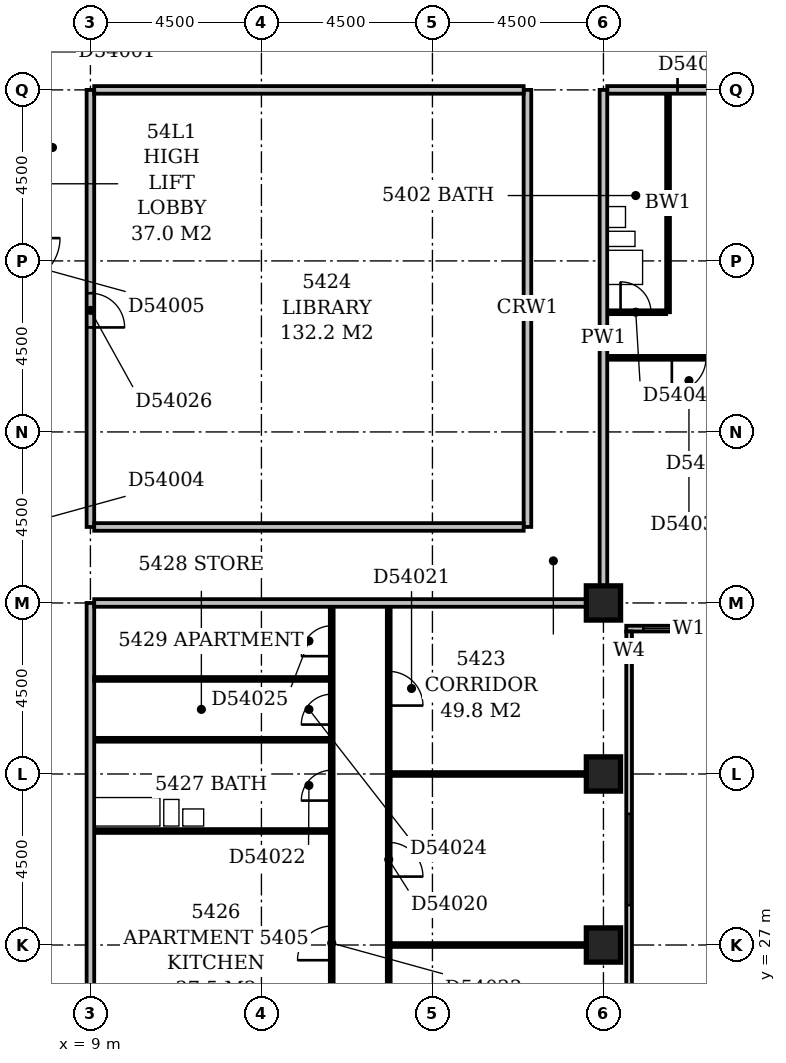
"""IFC4 building model, lengths in metres.
Left out: names, types, materials, properties, quantities, classifications, styles, units other than length and angle.
Written with IfcOpenShell. Run it as: python <this file> out.ifc"""

import sys

from ifc_helpers import new_model, si_unit, direction, frame, frame_2d, origin, origin_2d, place, context, subcontext, project, spatial, rectangle, extrude, element, fill, save


model = new_model("IFC4")
c1 = context("Model", 3, precision=1e-05, world=origin(), true_north=direction((0.0, 1.0)))
c2 = subcontext(c1, "Body", "Model", "MODEL_VIEW")
j1 = project(units=[si_unit("LENGTHUNIT", "METRE"), si_unit("PLANEANGLEUNIT", "RADIAN")], contexts=[c1])
p1 = place(None, origin())
s1 = spatial("IfcSite", under=j1, at=p1, CompositionType="ELEMENT")
p2 = place(p1, origin())
s2 = spatial("IfcBuilding", under=s1, at=p2, CompositionType="ELEMENT")
p3 = place(p2, frame((0.0, 0.0, 211.4)))
s3 = spatial("IfcBuildingStorey", under=s2, at=p3, CompositionType="ELEMENT", Elevation=211.4)
for number, where, z_axis, x_axis in (
    (1, (22.5, 27.0, -0.35), (0.0, 0.0, 1.0), (1.0, 0.0, 0.0)),
    (2, (22.5, 31.5, -0.35), (0.0, 0.0, 1.0), (1.0, 0.0, 0.0)),
    (3, (22.5, 36.0, -0.35), (0.0, 0.0, 1.0), (1.0, 0.0, 0.0)),
):
    element("IfcColumn", number, at=place(p3, frame(where, z_axis=z_axis, x_axis=x_axis)), inside=s3, PredefinedType="COLUMN", context=c2, shape_type="SweptSolid", body=[
        extrude(rectangle(XDim=0.9, YDim=0.9, at=origin_2d()), origin(), (0.0, 0.0, 1.0), 3.65),
    ])
p4 = place(p3, frame((23.175, 17.4, 0.0), z_axis=(0.0, 0.0, 1.0), x_axis=(0.0, 1.0, 0.0)))
e4 = element("IfcWall", 4, at=p4, inside=s3, PredefinedType="STANDARD", context=c2, shape_type="SweptSolid", body=[
    extrude(rectangle(XDim=17.85, YDim=0.15, at=frame_2d((8.925, 0.0))), origin(), (0.0, 0.0, 1.0), 2.7),
])
p5 = place(p4, frame((1.65, 0.0, 0.6)))
e5 = element("IfcOpeningElement", 5, at=p5, cuts=e4, PredefinedType="OPENING", context=c2, shape_type="SweptSolid", body=[
    extrude(rectangle(XDim=2.4, YDim=1.8, at=frame_2d((1.2, 0.9))), frame((0.0, 0.087, 0.0), z_axis=(0.0, -1.0, 0.0), x_axis=(1.0, 0.0, 0.0)), (0.0, 0.0, 1.0), 0.174),
])
p6 = place(p4, frame((6.15, 0.0, 0.6)))
e6 = element("IfcOpeningElement", 6, at=p6, cuts=e4, PredefinedType="OPENING", context=c2, shape_type="SweptSolid", body=[
    extrude(rectangle(XDim=2.4, YDim=1.8, at=frame_2d((1.2, 0.9))), frame((0.0, 0.087, 0.0), z_axis=(0.0, -1.0, 0.0), x_axis=(1.0, 0.0, 0.0)), (0.0, 0.0, 1.0), 0.174),
])
p7 = place(p4, frame((10.65, 0.0, 0.6)))
e7 = element("IfcOpeningElement", 7, at=p7, cuts=e4, PredefinedType="OPENING", context=c2, shape_type="SweptSolid", body=[
    extrude(rectangle(XDim=2.4, YDim=1.8, at=frame_2d((1.2, 0.9))), frame((0.0, 0.087, 0.0), z_axis=(0.0, -1.0, 0.0), x_axis=(1.0, 0.0, 0.0)), (0.0, 0.0, 1.0), 0.174),
])
p8 = place(p4, frame((17.027, 0.0, 0.6)))
e8 = element("IfcOpeningElement", 8, at=p8, cuts=e4, PredefinedType="OPENING", context=c2, shape_type="SweptSolid", body=[
    extrude(rectangle(XDim=0.6, YDim=1.8, at=frame_2d((0.3, 0.9))), frame((0.0, 0.087, 0.0), z_axis=(0.0, -1.0, 0.0), x_axis=(1.0, 0.0, 0.0)), (0.0, 0.0, 1.0), 0.174),
])
p9 = place(p3, frame((23.1, 35.325, 0.0), z_axis=(0.0, 0.0, 1.0), x_axis=(1.0, 0.0, 0.0)))
e9 = element("IfcWall", 9, at=p9, inside=s3, PredefinedType="STANDARD", context=c2, shape_type="SweptSolid", body=[
    extrude(rectangle(XDim=27.15, YDim=0.15, at=frame_2d((13.575, 0.0))), origin(), (0.0, 0.0, 1.0), 2.7),
])
p10 = place(p9, frame((0.45, 0.0, 0.6)))
e10 = element("IfcOpeningElement", 10, at=p10, cuts=e9, PredefinedType="OPENING", context=c2, shape_type="SweptSolid", body=[
    extrude(rectangle(XDim=2.4, YDim=1.8, at=frame_2d((1.2, 0.9))), frame((0.0, 0.087, 0.0), z_axis=(0.0, -1.0, 0.0), x_axis=(1.0, 0.0, 0.0)), (0.0, 0.0, 1.0), 0.174),
])
p11 = place(p9, frame((4.95, 0.0, 0.6)))
e11 = element("IfcOpeningElement", 11, at=p11, cuts=e9, PredefinedType="OPENING", context=c2, shape_type="SweptSolid", body=[
    extrude(rectangle(XDim=2.4, YDim=1.8, at=frame_2d((1.2, 0.9))), frame((0.0, 0.087, 0.0), z_axis=(0.0, -1.0, 0.0), x_axis=(1.0, 0.0, 0.0)), (0.0, 0.0, 1.0), 0.174),
])
p12 = place(p9, frame((9.062, 0.0, 0.6)))
e12 = element("IfcOpeningElement", 12, at=p12, cuts=e9, PredefinedType="OPENING", context=c2, shape_type="SweptSolid", body=[
    extrude(rectangle(XDim=1.8, YDim=1.8, at=frame_2d((0.9, 0.9))), frame((0.0, 0.087, 0.0), z_axis=(0.0, -1.0, 0.0), x_axis=(1.0, 0.0, 0.0)), (0.0, 0.0, 1.0), 0.174),
])
p13 = place(p9, frame((15.157, 0.0, 0.6)))
e13 = element("IfcOpeningElement", 13, at=p13, cuts=e9, PredefinedType="OPENING", context=c2, shape_type="SweptSolid", body=[
    extrude(rectangle(XDim=1.5, YDim=1.8, at=frame_2d((0.75, 0.9))), frame((0.0, 0.087, 0.0), z_axis=(0.0, -1.0, 0.0), x_axis=(1.0, 0.0, 0.0)), (0.0, 0.0, 1.0), 0.174),
])
p14 = place(p9, frame((18.45, 0.0, 0.6)))
e14 = element("IfcOpeningElement", 14, at=p14, cuts=e9, PredefinedType="OPENING", context=c2, shape_type="SweptSolid", body=[
    extrude(rectangle(XDim=2.4, YDim=1.8, at=frame_2d((1.2, 0.9))), frame((0.0, 0.087, 0.0), z_axis=(0.0, -1.0, 0.0), x_axis=(1.0, 0.0, 0.0)), (0.0, 0.0, 1.0), 0.174),
])
p15 = place(p9, frame((22.95, 0.0, 0.6)))
e15 = element("IfcOpeningElement", 15, at=p15, cuts=e9, PredefinedType="OPENING", context=c2, shape_type="SweptSolid", body=[
    extrude(rectangle(XDim=2.4, YDim=1.8, at=frame_2d((1.2, 0.9))), frame((0.0, 0.087, 0.0), z_axis=(0.0, -1.0, 0.0), x_axis=(1.0, 0.0, 0.0)), (0.0, 0.0, 1.0), 0.174),
])
p16 = place(p3, frame((9.0, 18.45, 0.0), z_axis=(0.0, 0.0, 1.0), x_axis=(0.0, 1.0, 0.0)))
e16 = element("IfcWall", 16, at=p16, inside=s3, PredefinedType="PARTITIONING", context=c2, shape_type="SweptSolid", body=[
    extrude(rectangle(XDim=17.55, YDim=0.2, at=frame_2d((8.775, 0.0))), origin(), (0.0, 0.0, 1.0), 3.3),
])
p17 = place(p16, frame((4.35, 0.0, 0.0)))
e17 = element("IfcOpeningElement", 17, at=p17, cuts=e16, PredefinedType="OPENING", context=c2, shape_type="SweptSolid", body=[
    extrude(rectangle(XDim=1.0, YDim=2.1, at=frame_2d((0.5, 1.05))), frame((0.0, 0.112, 0.0), z_axis=(0.0, -1.0, 0.0), x_axis=(1.0, 0.0, 0.0)), (0.0, 0.0, 1.0), 0.224),
])
p18 = place(p16, frame((2.8, 0.0, 0.0)))
e18 = element("IfcOpeningElement", 18, at=p18, cuts=e16, PredefinedType="OPENING", context=c2, shape_type="SweptSolid", body=[
    extrude(rectangle(XDim=1.0, YDim=2.1, at=frame_2d((0.5, 1.05))), frame((0.0, 0.112, 0.0), z_axis=(0.0, -1.0, 0.0), x_axis=(1.0, 0.0, 0.0)), (0.0, 0.0, 1.0), 0.224),
])
p19 = place(p3, frame((16.85, 22.6, 0.0), z_axis=(0.0, 0.0, 1.0), x_axis=(0.0, 1.0, 0.0)))
e19 = element("IfcWall", 19, at=p19, inside=s3, PredefinedType="PARTITIONING", context=c2, shape_type="SweptSolid", body=[
    extrude(rectangle(XDim=13.3, YDim=0.1, at=frame_2d((6.65, 0.0))), origin(), (0.0, 0.0, 1.0), 3.3),
])
p20 = place(p19, frame((1.7, 0.0, 0.0)))
e20 = element("IfcOpeningElement", 20, at=p20, cuts=e19, PredefinedType="OPENING", context=c2, shape_type="SweptSolid", body=[
    extrude(rectangle(XDim=0.9, YDim=2.1, at=frame_2d((0.45, 1.05))), frame((0.0, 0.062, 0.0), z_axis=(0.0, -1.0, 0.0), x_axis=(1.0, 0.0, 0.0)), (0.0, 0.0, 1.0), 0.124),
])
p21 = place(p19, frame((6.2, 0.0, 0.0)))
e21 = element("IfcOpeningElement", 21, at=p21, cuts=e19, PredefinedType="OPENING", context=c2, shape_type="SweptSolid", body=[
    extrude(rectangle(XDim=0.9, YDim=2.1, at=frame_2d((0.45, 1.05))), frame((0.0, 0.062, 0.0), z_axis=(0.0, -1.0, 0.0), x_axis=(1.0, 0.0, 0.0)), (0.0, 0.0, 1.0), 0.124),
])
p22 = place(p19, frame((10.7, 0.0, 0.0)))
e22 = element("IfcOpeningElement", 22, at=p22, cuts=e19, PredefinedType="OPENING", context=c2, shape_type="SweptSolid", body=[
    extrude(rectangle(XDim=0.9, YDim=2.1, at=frame_2d((0.45, 1.05))), frame((0.0, 0.062, 0.0), z_axis=(0.0, -1.0, 0.0), x_axis=(1.0, 0.0, 0.0)), (0.0, 0.0, 1.0), 0.124),
])
p23 = place(p3, frame((15.35, 24.1, 0.0), z_axis=(0.0, 0.0, 1.0), x_axis=(0.0, 1.0, 0.0)))
e23 = element("IfcWall", 23, at=p23, inside=s3, PredefinedType="PARTITIONING", context=c2, shape_type="SweptSolid", body=[
    extrude(rectangle(XDim=11.8, YDim=0.1, at=frame_2d((5.9, 0.0))), origin(), (0.0, 0.0, 1.0), 3.3),
])
p24 = place(p23, frame((6.7, 0.0, 0.0)))
e24 = element("IfcOpeningElement", 24, at=p24, cuts=e23, PredefinedType="OPENING", context=c2, shape_type="SweptSolid", body=[
    extrude(rectangle(XDim=0.8, YDim=2.1, at=frame_2d((0.4, 1.05))), frame((0.0, 0.062, 0.0), z_axis=(0.0, -1.0, 0.0), x_axis=(1.0, 0.0, 0.0)), (0.0, 0.0, 1.0), 0.124),
])
p25 = place(p23, frame((2.5, 0.0, 0.0)))
e25 = element("IfcOpeningElement", 25, at=p25, cuts=e23, PredefinedType="OPENING", context=c2, shape_type="SweptSolid", body=[
    extrude(rectangle(XDim=0.9, YDim=2.1, at=frame_2d((0.45, 1.05))), frame((0.0, 0.062, 0.0), z_axis=(0.0, -1.0, 0.0), x_axis=(1.0, 0.0, 0.0)), (0.0, 0.0, 1.0), 0.124),
])
p26 = place(p23, frame((8.7, 0.0, 0.0)))
e26 = element("IfcOpeningElement", 26, at=p26, cuts=e23, PredefinedType="OPENING", context=c2, shape_type="SweptSolid", body=[
    extrude(rectangle(XDim=0.8, YDim=2.1, at=frame_2d((0.4, 1.05))), frame((0.0, 0.062, 0.0), z_axis=(0.0, -1.0, 0.0), x_axis=(1.0, 0.0, 0.0)), (0.0, 0.0, 1.0), 0.124),
])
p27 = place(p23, frame((10.5, 0.0, 0.0)))
e27 = element("IfcOpeningElement", 27, at=p27, cuts=e23, PredefinedType="OPENING", context=c2, shape_type="SweptSolid", body=[
    extrude(rectangle(XDim=0.8, YDim=2.1, at=frame_2d((0.4, 1.05))), frame((0.0, 0.062, 0.0), z_axis=(0.0, -1.0, 0.0), x_axis=(1.0, 0.0, 0.0)), (0.0, 0.0, 1.0), 0.124),
])
p28 = place(p3, frame((16.9, 27.0, 0.0), z_axis=(0.0, 0.0, 1.0), x_axis=(1.0, 0.0, 0.0)))
e28 = element("IfcWall", 28, at=p28, inside=s3, PredefinedType="PARTITIONING", context=c2, shape_type="SweptSolid", body=[
    extrude(rectangle(XDim=5.15, YDim=0.1, at=frame_2d((2.575, 0.0))), origin(), (0.0, 0.0, 1.0), 2.7),
])
p29 = place(p3, frame((9.1, 30.0, 0.0), z_axis=(0.0, 0.0, 1.0), x_axis=(1.0, 0.0, 0.0)))
e29 = element("IfcWall", 29, at=p29, inside=s3, PredefinedType="PLUMBINGWALL", context=c2, shape_type="SweptSolid", body=[
    extrude(rectangle(XDim=6.2, YDim=0.1, at=frame_2d((3.1, 0.0))), origin(), (0.0, 0.0, 1.0), 3.3),
])
p30 = place(p3, frame((16.9, 31.5, 0.0), z_axis=(0.0, 0.0, 1.0), x_axis=(1.0, 0.0, 0.0)))
e30 = element("IfcWall", 30, at=p30, inside=s3, PredefinedType="PARTITIONING", context=c2, shape_type="SweptSolid", body=[
    extrude(rectangle(XDim=5.15, YDim=0.1, at=frame_2d((2.575, 0.0))), origin(), (0.0, 0.0, 1.0), 3.3),
])
p31 = place(p3, frame((9.1, 32.4, 0.0), z_axis=(0.0, 0.0, 1.0), x_axis=(1.0, 0.0, 0.0)))
e31 = element("IfcWall", 31, at=p31, inside=s3, PredefinedType="PLUMBINGWALL", context=c2, shape_type="SweptSolid", body=[
    extrude(rectangle(XDim=6.2, YDim=0.1, at=frame_2d((3.1, 0.0))), origin(), (0.0, 0.0, 1.0), 3.3),
])
p32 = place(p3, frame((9.1, 34.0, 0.0), z_axis=(0.0, 0.0, 1.0), x_axis=(1.0, 0.0, 0.0)))
e32 = element("IfcWall", 32, at=p32, inside=s3, PredefinedType="PARTITIONING", context=c2, shape_type="SweptSolid", body=[
    extrude(rectangle(XDim=6.2, YDim=0.1, at=frame_2d((3.1, 0.0))), origin(), (0.0, 0.0, 1.0), 3.3),
])
p33 = place(p3, frame((9.1, 36.0, 0.0), z_axis=(0.0, 0.0, 1.0), x_axis=(1.0, 0.0, 0.0)))
e33 = element("IfcWall", 33, at=p33, inside=s3, PredefinedType="PARTITIONING", context=c2, shape_type="SweptSolid", body=[
    extrude(rectangle(XDim=12.95, YDim=0.2, at=frame_2d((6.475, 0.0))), origin(), (0.0, 0.0, 1.0), 3.3),
])
p34 = place(p3, frame((22.5, 36.45, 0.0), z_axis=(0.0, 0.0, 1.0), x_axis=(0.0, 1.0, 0.0)))
e34 = element("IfcWall", 34, at=p34, inside=s3, PredefinedType="PARTITIONING", context=c2, shape_type="SweptSolid", body=[
    extrude(rectangle(XDim=13.05, YDim=0.2, at=frame_2d((6.525, 0.0))), origin(), (0.0, 0.0, 1.0), 3.3),
])
p35 = place(p3, frame((9.0, 38.0, 0.0), z_axis=(0.0, 0.0, 1.0), x_axis=(0.0, 1.0, 0.0)))
e35 = element("IfcWall", 35, at=p35, inside=s3, PredefinedType="PARTITIONING", context=c2, shape_type="SweptSolid", body=[
    extrude(rectangle(XDim=11.5, YDim=0.2, at=frame_2d((5.75, 0.0))), origin(), (0.0, 0.0, 1.0), 3.3),
])
p36 = place(p35, frame((5.25, 0.0, 0.0)))
e36 = element("IfcOpeningElement", 36, at=p36, cuts=e35, PredefinedType="OPENING", context=c2, shape_type="SweptSolid", body=[
    extrude(rectangle(XDim=0.9, YDim=2.1, at=frame_2d((0.45, 1.05))), frame((0.0, 0.112, 0.0), z_axis=(0.0, -1.0, 0.0), x_axis=(1.0, 0.0, 0.0)), (0.0, 0.0, 1.0), 0.224),
])
p37 = place(p3, frame((9.1, 38.0, 0.0), z_axis=(0.0, 0.0, 1.0), x_axis=(1.0, 0.0, 0.0)))
e37 = element("IfcWall", 37, at=p37, inside=s3, PredefinedType="PARTITIONING", context=c2, shape_type="SweptSolid", body=[
    extrude(rectangle(XDim=11.3, YDim=0.2, at=frame_2d((5.65, 0.0))), origin(), (0.0, 0.0, 1.0), 3.3),
])
p38 = place(p3, frame((20.5, 38.0, 0.0), z_axis=(0.0, 0.0, 1.0), x_axis=(0.0, 1.0, 0.0)))
e38 = element("IfcWall", 38, at=p38, inside=s3, PredefinedType="PARTITIONING", context=c2, shape_type="SweptSolid", body=[
    extrude(rectangle(XDim=11.5, YDim=0.2, at=frame_2d((5.75, 0.0))), origin(), (0.0, 0.0, 1.0), 3.3),
])
p39 = place(p3, frame((22.6, 42.45, 0.0), z_axis=(0.0, 0.0, 1.0), x_axis=(1.0, 0.0, 0.0)))
e39 = element("IfcWall", 39, at=p39, inside=s3, PredefinedType="PARTITIONING", context=c2, shape_type="SweptSolid", body=[
    extrude(rectangle(XDim=4.3, YDim=0.1, at=frame_2d((2.15, 0.0))), origin(), (0.0, 0.0, 1.0), 3.3),
])
p40 = place(p39, frame((1.7, 0.0, 0.0)))
e40 = element("IfcOpeningElement", 40, at=p40, cuts=e39, PredefinedType="OPENING", context=c2, shape_type="SweptSolid", body=[
    extrude(rectangle(XDim=0.9, YDim=2.1, at=frame_2d((0.45, 1.05))), frame((0.0, 0.062, 0.0), z_axis=(0.0, -1.0, 0.0), x_axis=(1.0, 0.0, 0.0)), (0.0, 0.0, 1.0), 0.124),
])
p41 = place(p3, frame((22.6, 43.65, 0.0), z_axis=(0.0, 0.0, 1.0), x_axis=(1.0, 0.0, 0.0)))
e41 = element("IfcWall", 41, at=p41, inside=s3, PredefinedType="PARTITIONING", context=c2, shape_type="SweptSolid", body=[
    extrude(rectangle(XDim=1.55, YDim=0.1, at=frame_2d((0.775, 0.0))), origin(), (0.0, 0.0, 1.0), 3.3),
])
p42 = place(p41, frame((0.35, 0.0, 0.0)))
e42 = element("IfcOpeningElement", 42, at=p42, cuts=e41, PredefinedType="OPENING", context=c2, shape_type="SweptSolid", body=[
    extrude(rectangle(XDim=0.8, YDim=2.1, at=frame_2d((0.4, 1.05))), frame((0.0, 0.062, 0.0), z_axis=(0.0, -1.0, 0.0), x_axis=(1.0, 0.0, 0.0)), (0.0, 0.0, 1.0), 0.124),
])
p43 = place(p3, frame((24.2, 43.65, 0.0), z_axis=(0.0, 0.0, 1.0), x_axis=(0.0, 1.0, 0.0)))
e43 = element("IfcWall", 43, at=p43, inside=s3, PredefinedType="PLUMBINGWALL", context=c2, shape_type="SweptSolid", body=[
    extrude(rectangle(XDim=5.75, YDim=0.1, at=frame_2d((2.875, 0.0))), origin(), (0.0, 0.0, 1.0), 3.3),
])
p44 = place(p3, frame((9.1, 49.5, 0.0), z_axis=(0.0, 0.0, 1.0), x_axis=(1.0, 0.0, 0.0)))
e44 = element("IfcWall", 44, at=p44, inside=s3, PredefinedType="PARTITIONING", context=c2, shape_type="SweptSolid", body=[
    extrude(rectangle(XDim=11.3, YDim=0.2, at=frame_2d((5.65, 0.0))), origin(), (0.0, 0.0, 1.0), 3.3),
])
p45 = place(p3, frame((22.6, 49.5, 0.0), z_axis=(0.0, 0.0, 1.0), x_axis=(1.0, 0.0, 0.0)))
e45 = element("IfcWall", 45, at=p45, inside=s3, PredefinedType="PARTITIONING", context=c2, shape_type="SweptSolid", body=[
    extrude(rectangle(XDim=30.95, YDim=0.2, at=frame_2d((15.475, 0.0))), origin(), (0.0, 0.0, 1.0), 3.3),
])
p46 = place(p45, frame((1.85, 0.0, 0.0)))
e46 = element("IfcOpeningElement", 46, at=p46, cuts=e45, PredefinedType="OPENING", context=c2, shape_type="SweptSolid", body=[
    extrude(rectangle(XDim=1.0, YDim=2.1, at=frame_2d((0.5, 1.05))), frame((0.0, 0.112, 0.0), z_axis=(0.0, -1.0, 0.0), x_axis=(1.0, 0.0, 0.0)), (0.0, 0.0, 1.0), 0.224),
])
p47 = place(p45, frame((4.7, 0.0, 0.0)))
e47 = element("IfcOpeningElement", 47, at=p47, cuts=e45, PredefinedType="OPENING", context=c2, shape_type="SweptSolid", body=[
    extrude(rectangle(XDim=1.0, YDim=2.1, at=frame_2d((0.5, 1.05))), frame((0.0, 0.112, 0.0), z_axis=(0.0, -1.0, 0.0), x_axis=(1.0, 0.0, 0.0)), (0.0, 0.0, 1.0), 0.224),
])
p48 = place(p45, frame((18.2, 0.0, 0.0)))
e48 = element("IfcOpeningElement", 48, at=p48, cuts=e45, PredefinedType="OPENING", context=c2, shape_type="SweptSolid", body=[
    extrude(rectangle(XDim=1.0, YDim=2.1, at=frame_2d((0.5, 1.05))), frame((0.0, 0.112, 0.0), z_axis=(0.0, -1.0, 0.0), x_axis=(1.0, 0.0, 0.0)), (0.0, 0.0, 1.0), 0.224),
])
p49 = place(p45, frame((27.15, 0.0, 0.0)))
e49 = element("IfcOpeningElement", 49, at=p49, cuts=e45, PredefinedType="OPENING", context=c2, shape_type="SweptSolid", body=[
    extrude(rectangle(XDim=1.0, YDim=2.1, at=frame_2d((0.5, 1.05))), frame((0.0, 0.112, 0.0), z_axis=(0.0, -1.0, 0.0), x_axis=(1.0, 0.0, 0.0)), (0.0, 0.0, 1.0), 0.224),
])
p50 = place(p7, origin())
e50 = element("IfcWindow", 50, at=p50, inside=s3, PartitioningType="SINGLE_PANEL", PredefinedType="WINDOW", context=c2, shape_type="SweptSolid", body=[
    extrude(rectangle(XDim=2.4, YDim=1.8, at=frame_2d((1.2, 0.9))), frame((0.0, 0.03, 0.0), z_axis=(0.0, -1.0, 0.0), x_axis=(1.0, 0.0, 0.0)), (0.0, 0.0, 1.0), 0.06),
])
fill(e7, e50)
p51 = place(p8, origin())
e51 = element("IfcWindow", 51, at=p51, inside=s3, PartitioningType="SINGLE_PANEL", PredefinedType="WINDOW", context=c2, shape_type="SweptSolid", body=[
    extrude(rectangle(XDim=0.6, YDim=1.8, at=frame_2d((0.3, 0.9))), frame((0.0, 0.03, 0.0), z_axis=(0.0, -1.0, 0.0), x_axis=(1.0, 0.0, 0.0)), (0.0, 0.0, 1.0), 0.06),
])
fill(e8, e51)
p52 = place(p10, origin())
e52 = element("IfcWindow", 52, at=p52, inside=s3, PartitioningType="SINGLE_PANEL", PredefinedType="WINDOW", context=c2, shape_type="SweptSolid", body=[
    extrude(rectangle(XDim=2.4, YDim=1.8, at=frame_2d((1.2, 0.9))), frame((0.0, 0.03, 0.0), z_axis=(0.0, -1.0, 0.0), x_axis=(1.0, 0.0, 0.0)), (0.0, 0.0, 1.0), 0.06),
])
fill(e10, e52)
p53 = place(p21, frame((0.9, 0.0, 0.0), z_axis=(0.0, 0.0, 1.0), x_axis=(-1.0, 0.0, 0.0)))
e53 = element("IfcDoor", 53, at=p53, inside=s3, OperationType="SINGLE_SWING_RIGHT", PredefinedType="DOOR", context=c2, shape_type="SweptSolid", body=[
    extrude(rectangle(XDim=0.9, YDim=2.1, at=frame_2d((0.45, 1.05))), frame((0.0, 0.025, 0.0), z_axis=(0.0, -1.0, 0.0), x_axis=(1.0, 0.0, 0.0)), (0.0, 0.0, 1.0), 0.05),
])
fill(e21, e53)
p54 = place(p22, frame((0.9, 0.0, 0.0), z_axis=(0.0, 0.0, 1.0), x_axis=(-1.0, 0.0, 0.0)))
e54 = element("IfcDoor", 54, at=p54, inside=s3, OperationType="SINGLE_SWING_RIGHT", PredefinedType="DOOR", context=c2, shape_type="SweptSolid", body=[
    extrude(rectangle(XDim=0.9, YDim=2.1, at=frame_2d((0.45, 1.05))), frame((0.0, 0.025, 0.0), z_axis=(0.0, -1.0, 0.0), x_axis=(1.0, 0.0, 0.0)), (0.0, 0.0, 1.0), 0.05),
])
fill(e22, e54)
p55 = place(p24, origin())
e55 = element("IfcDoor", 55, at=p55, inside=s3, OperationType="SINGLE_SWING_LEFT", PredefinedType="DOOR", context=c2, shape_type="SweptSolid", body=[
    extrude(rectangle(XDim=0.8, YDim=2.1, at=frame_2d((0.4, 1.05))), frame((0.0, 0.025, 0.0), z_axis=(0.0, -1.0, 0.0), x_axis=(1.0, 0.0, 0.0)), (0.0, 0.0, 1.0), 0.05),
])
fill(e24, e55)
p56 = place(p25, origin())
e56 = element("IfcDoor", 56, at=p56, inside=s3, OperationType="SINGLE_SWING_LEFT", PredefinedType="DOOR", context=c2, shape_type="SweptSolid", body=[
    extrude(rectangle(XDim=0.9, YDim=2.1, at=frame_2d((0.45, 1.05))), frame((0.0, 0.025, 0.0), z_axis=(0.0, -1.0, 0.0), x_axis=(1.0, 0.0, 0.0)), (0.0, 0.0, 1.0), 0.05),
])
fill(e25, e56)
p57 = place(p26, origin())
e57 = element("IfcDoor", 57, at=p57, inside=s3, OperationType="SINGLE_SWING_LEFT", PredefinedType="DOOR", context=c2, shape_type="SweptSolid", body=[
    extrude(rectangle(XDim=0.8, YDim=2.1, at=frame_2d((0.4, 1.05))), frame((0.0, 0.025, 0.0), z_axis=(0.0, -1.0, 0.0), x_axis=(1.0, 0.0, 0.0)), (0.0, 0.0, 1.0), 0.05),
])
fill(e26, e57)
p58 = place(p27, origin())
e58 = element("IfcDoor", 58, at=p58, inside=s3, OperationType="SINGLE_SWING_LEFT", PredefinedType="DOOR", context=c2, shape_type="SweptSolid", body=[
    extrude(rectangle(XDim=0.8, YDim=2.1, at=frame_2d((0.4, 1.05))), frame((0.0, 0.025, 0.0), z_axis=(0.0, -1.0, 0.0), x_axis=(1.0, 0.0, 0.0)), (0.0, 0.0, 1.0), 0.05),
])
fill(e27, e58)
p59 = place(p36, frame((0.9, 0.0, 0.0), z_axis=(0.0, 0.0, 1.0), x_axis=(-1.0, 0.0, 0.0)))
e59 = element("IfcDoor", 59, at=p59, inside=s3, OperationType="SINGLE_SWING_RIGHT", PredefinedType="DOOR", context=c2, shape_type="SweptSolid", body=[
    extrude(rectangle(XDim=0.9, YDim=2.1, at=frame_2d((0.45, 1.05))), frame((0.0, 0.025, 0.0), z_axis=(0.0, -1.0, 0.0), x_axis=(1.0, 0.0, 0.0)), (0.0, 0.0, 1.0), 0.05),
])
fill(e36, e59)
p60 = place(p40, frame((0.9, 0.0, 0.0), z_axis=(0.0, 0.0, 1.0), x_axis=(-1.0, 0.0, 0.0)))
e60 = element("IfcDoor", 60, at=p60, inside=s3, OperationType="SINGLE_SWING_RIGHT", PredefinedType="DOOR", context=c2, shape_type="SweptSolid", body=[
    extrude(rectangle(XDim=0.9, YDim=2.1, at=frame_2d((0.45, 1.05))), frame((0.0, 0.025, 0.0), z_axis=(0.0, -1.0, 0.0), x_axis=(1.0, 0.0, 0.0)), (0.0, 0.0, 1.0), 0.05),
])
fill(e40, e60)
p61 = place(p42, origin())
e61 = element("IfcDoor", 61, at=p61, inside=s3, OperationType="SINGLE_SWING_LEFT", PredefinedType="DOOR", context=c2, shape_type="SweptSolid", body=[
    extrude(rectangle(XDim=0.8, YDim=2.1, at=frame_2d((0.4, 1.05))), frame((0.0, 0.025, 0.0), z_axis=(0.0, -1.0, 0.0), x_axis=(1.0, 0.0, 0.0)), (0.0, 0.0, 1.0), 0.05),
])
fill(e42, e61)
p62 = place(p46, origin())
e62 = element("IfcDoor", 62, at=p62, inside=s3, OperationType="SINGLE_SWING_LEFT", PredefinedType="DOOR", context=c2, shape_type="SweptSolid", body=[
    extrude(rectangle(XDim=1.0, YDim=2.1, at=frame_2d((0.5, 1.05))), frame((0.0, 0.025, 0.0), z_axis=(0.0, -1.0, 0.0), x_axis=(1.0, 0.0, 0.0)), (0.0, 0.0, 1.0), 0.05),
])
fill(e46, e62)
save(model, sys.argv[1])
